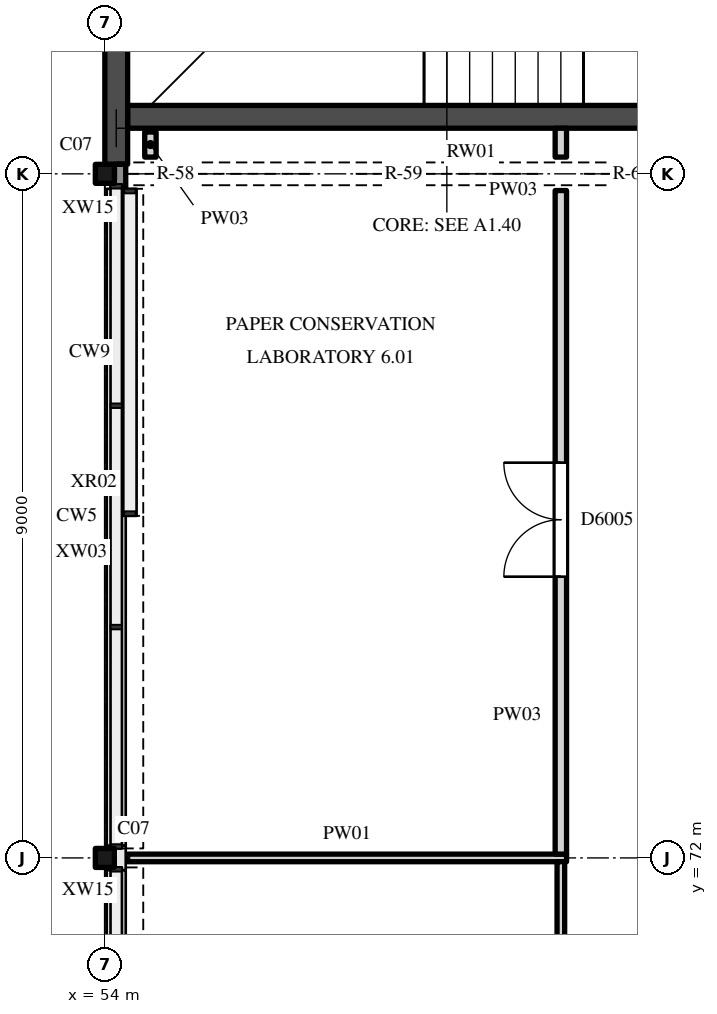
"""IFC4 building model, lengths in metres.
Left out: names, types, materials, properties, quantities, classifications, styles, units other than length and angle.
Written with IfcOpenShell. Run it as: python <this file> out.ifc"""

import sys

from ifc_helpers import new_model, si_unit, direction, frame, frame_2d, origin, origin_2d, place, context, subcontext, project, spatial, polyline, rectangle, hollow_rectangle, outline, extrude, element, fill, save


model = new_model("IFC4")
c1 = context("Model", 3, precision=1e-05, world=origin(), true_north=direction((0.0, 1.0)))
c2 = subcontext(c1, "Body", "Model", "MODEL_VIEW")
j1 = project(units=[si_unit("LENGTHUNIT", "METRE"), si_unit("PLANEANGLEUNIT", "RADIAN")], contexts=[c1])
p1 = place(None, origin())
s1 = spatial("IfcSite", under=j1, at=p1, CompositionType="ELEMENT")
p2 = place(p1, origin())
s2 = spatial("IfcBuilding", under=s1, at=p2, CompositionType="ELEMENT")
p3 = place(p2, frame((0.0, 0.0, 36.0)))
s3 = spatial("IfcBuildingStorey", under=s2, at=p3, CompositionType="ELEMENT", Elevation=36.0)
for number, where, z_axis, x_axis in (
    (1, (54.0, 72.0, 0.0), (0.0, 0.0, 1.0), (1.0, 0.0, 0.0)),
    (2, (54.0, 81.0, 0.0), (0.0, 0.0, 1.0), (1.0, 0.0, 0.0)),
):
    element("IfcColumn", number, at=place(p3, frame(where, z_axis=z_axis, x_axis=x_axis)), inside=s3, PredefinedType="COLUMN", context=c2, shape_type="SweptSolid", body=[
        extrude(hollow_rectangle(XDim=0.25, YDim=0.25, WallThickness=0.009, InnerFilletRadius=0.013, OuterFilletRadius=0.022, at=origin_2d()), origin(), (0.0, 0.0, 1.0), 8.0),
    ])
p4 = place(p3, frame((54.3, 81.75, 0.0), z_axis=(0.0, 0.0, 1.0), x_axis=(1.0, 0.0, 0.0)))
e3 = element("IfcWall", 3, at=p4, inside=s3, PredefinedType="SHEAR", context=c2, shape_type="SweptSolid", body=[
    extrude(rectangle(XDim=8.1, YDim=0.3, at=frame_2d((4.05, 0.0))), origin(), (0.0, 0.0, 1.0), 14.344),
])
p5 = place(p3, frame((54.15, 81.125, 0.0), z_axis=(0.0, 0.0, 1.0), x_axis=(0.0, 1.0, 0.0)))
e4 = element("IfcWall", 4, at=p5, inside=s3, PredefinedType="SHEAR", context=c2, shape_type="SweptSolid", body=[
    extrude(outline(polyline([(0.0, 0.0), (8.711, 0.0), (8.711, 7.875), (0.0, 14.844), (0.0, 0.0)])), frame((0.0, 0.15, 0.0), z_axis=(0.0, -1.0, 0.0), x_axis=(1.0, 0.0, 0.0)), (0.0, 0.0, 1.0), 0.3),
])
for number, where, z_axis, x_axis in (
    (5, (54.15, 63.197, 0.0), (0.0, 0.0, 1.0), (0.0, 1.0, 0.0)),
    (6, (54.15, 72.161, 0.0), (0.0, 0.0, 1.0), (0.0, 1.0, 0.0)),
):
    element("IfcWall", number, at=place(p3, frame(where, z_axis=z_axis, x_axis=x_axis)), inside=s3, PredefinedType="SOLIDWALL", context=c2, shape_type="SweptSolid", body=[
        extrude(rectangle(XDim=8.642, YDim=0.25, at=frame_2d((4.321, 0.0))), origin(), (0.0, 0.0, 1.0), 1.1),
    ])
p6 = place(p3, frame((54.2, 71.839, 0.0), z_axis=(0.0, 0.0, 1.0), x_axis=(0.0, 1.0, 0.0)))
e7 = element("IfcWall", 7, at=p6, inside=s3, PredefinedType="SOLIDWALL", context=c2, shape_type="SweptSolid", body=[
    extrude(rectangle(XDim=0.322, YDim=0.15, at=frame_2d((0.161, 0.0))), origin(), (0.0, 0.0, 1.0), 1.1),
])
p7 = place(p3, frame((54.2, 80.803, 0.0), z_axis=(0.0, 0.0, 1.0), x_axis=(0.0, 1.0, 0.0)))
e8 = element("IfcWall", 8, at=p7, inside=s3, PredefinedType="SOLIDWALL", context=c2, shape_type="SweptSolid", body=[
    extrude(rectangle(XDim=0.322, YDim=0.15, at=frame_2d((0.161, 0.0))), origin(), (0.0, 0.0, 1.0), 14.844),
])
p8 = place(p3, frame((54.15, 81.0, 15.2), z_axis=(0.0, 0.0, 1.0), x_axis=(1.0, 0.0, 0.0)))
e9 = element("IfcWall", 9, at=p8, inside=s3, PredefinedType="SOLIDWALL", context=c2, shape_type="SweptSolid", body=[
    extrude(rectangle(XDim=62.7, YDim=0.3, at=frame_2d((31.35, 0.0))), origin(), (0.0, 0.0, 1.0), 0.9),
])
p9 = place(p8, frame((0.15, 0.0, 0.15)))
e10 = element("IfcOpeningElement", 10, at=p9, cuts=e9, PredefinedType="OPENING", context=c2, shape_type="SweptSolid", body=[
    extrude(rectangle(XDim=2.4, YDim=0.6, at=frame_2d((1.2, 0.3))), frame((0.0, 0.16, 0.0), z_axis=(0.0, -1.0, 0.0), x_axis=(1.0, 0.0, 0.0)), (0.0, 0.0, 1.0), 0.32),
])
p10 = place(p8, frame((3.15, 0.0, 0.15)))
e11 = element("IfcOpeningElement", 11, at=p10, cuts=e9, PredefinedType="OPENING", context=c2, shape_type="SweptSolid", body=[
    extrude(rectangle(XDim=2.4, YDim=0.6, at=frame_2d((1.2, 0.3))), frame((0.0, 0.16, 0.0), z_axis=(0.0, -1.0, 0.0), x_axis=(1.0, 0.0, 0.0)), (0.0, 0.0, 1.0), 0.32),
])
p11 = place(p8, frame((6.15, 0.0, 0.15)))
e12 = element("IfcOpeningElement", 12, at=p11, cuts=e9, PredefinedType="OPENING", context=c2, shape_type="SweptSolid", body=[
    extrude(rectangle(XDim=2.4, YDim=0.6, at=frame_2d((1.2, 0.3))), frame((0.0, 0.16, 0.0), z_axis=(0.0, -1.0, 0.0), x_axis=(1.0, 0.0, 0.0)), (0.0, 0.0, 1.0), 0.32),
])
p12 = place(p8, frame((9.15, 0.0, 0.15)))
e13 = element("IfcOpeningElement", 13, at=p12, cuts=e9, PredefinedType="OPENING", context=c2, shape_type="SweptSolid", body=[
    extrude(rectangle(XDim=2.4, YDim=0.6, at=frame_2d((1.2, 0.3))), frame((0.0, 0.16, 0.0), z_axis=(0.0, -1.0, 0.0), x_axis=(1.0, 0.0, 0.0)), (0.0, 0.0, 1.0), 0.32),
])
p13 = place(p8, frame((12.15, 0.0, 0.15)))
e14 = element("IfcOpeningElement", 14, at=p13, cuts=e9, PredefinedType="OPENING", context=c2, shape_type="SweptSolid", body=[
    extrude(rectangle(XDim=2.4, YDim=0.6, at=frame_2d((1.2, 0.3))), frame((0.0, 0.16, 0.0), z_axis=(0.0, -1.0, 0.0), x_axis=(1.0, 0.0, 0.0)), (0.0, 0.0, 1.0), 0.32),
])
p14 = place(p8, frame((15.15, 0.0, 0.15)))
e15 = element("IfcOpeningElement", 15, at=p14, cuts=e9, PredefinedType="OPENING", context=c2, shape_type="SweptSolid", body=[
    extrude(rectangle(XDim=2.4, YDim=0.6, at=frame_2d((1.2, 0.3))), frame((0.0, 0.16, 0.0), z_axis=(0.0, -1.0, 0.0), x_axis=(1.0, 0.0, 0.0)), (0.0, 0.0, 1.0), 0.32),
])
p15 = place(p8, frame((18.15, 0.0, 0.15)))
e16 = element("IfcOpeningElement", 16, at=p15, cuts=e9, PredefinedType="OPENING", context=c2, shape_type="SweptSolid", body=[
    extrude(rectangle(XDim=2.4, YDim=0.6, at=frame_2d((1.2, 0.3))), frame((0.0, 0.16, 0.0), z_axis=(0.0, -1.0, 0.0), x_axis=(1.0, 0.0, 0.0)), (0.0, 0.0, 1.0), 0.32),
])
p16 = place(p8, frame((21.15, 0.0, 0.15)))
e17 = element("IfcOpeningElement", 17, at=p16, cuts=e9, PredefinedType="OPENING", context=c2, shape_type="SweptSolid", body=[
    extrude(rectangle(XDim=2.4, YDim=0.6, at=frame_2d((1.2, 0.3))), frame((0.0, 0.16, 0.0), z_axis=(0.0, -1.0, 0.0), x_axis=(1.0, 0.0, 0.0)), (0.0, 0.0, 1.0), 0.32),
])
p17 = place(p8, frame((24.15, 0.0, 0.15)))
e18 = element("IfcOpeningElement", 18, at=p17, cuts=e9, PredefinedType="OPENING", context=c2, shape_type="SweptSolid", body=[
    extrude(rectangle(XDim=2.4, YDim=0.6, at=frame_2d((1.2, 0.3))), frame((0.0, 0.16, 0.0), z_axis=(0.0, -1.0, 0.0), x_axis=(1.0, 0.0, 0.0)), (0.0, 0.0, 1.0), 0.32),
])
p18 = place(p8, frame((27.15, 0.0, 0.15)))
e19 = element("IfcOpeningElement", 19, at=p18, cuts=e9, PredefinedType="OPENING", context=c2, shape_type="SweptSolid", body=[
    extrude(rectangle(XDim=2.4, YDim=0.6, at=frame_2d((1.2, 0.3))), frame((0.0, 0.16, 0.0), z_axis=(0.0, -1.0, 0.0), x_axis=(1.0, 0.0, 0.0)), (0.0, 0.0, 1.0), 0.32),
])
p19 = place(p8, frame((30.15, 0.0, 0.15)))
e20 = element("IfcOpeningElement", 20, at=p19, cuts=e9, PredefinedType="OPENING", context=c2, shape_type="SweptSolid", body=[
    extrude(rectangle(XDim=2.4, YDim=0.6, at=frame_2d((1.2, 0.3))), frame((0.0, 0.16, 0.0), z_axis=(0.0, -1.0, 0.0), x_axis=(1.0, 0.0, 0.0)), (0.0, 0.0, 1.0), 0.32),
])
p20 = place(p8, frame((33.15, 0.0, 0.15)))
e21 = element("IfcOpeningElement", 21, at=p20, cuts=e9, PredefinedType="OPENING", context=c2, shape_type="SweptSolid", body=[
    extrude(rectangle(XDim=2.4, YDim=0.6, at=frame_2d((1.2, 0.3))), frame((0.0, 0.16, 0.0), z_axis=(0.0, -1.0, 0.0), x_axis=(1.0, 0.0, 0.0)), (0.0, 0.0, 1.0), 0.32),
])
p21 = place(p8, frame((36.15, 0.0, 0.15)))
e22 = element("IfcOpeningElement", 22, at=p21, cuts=e9, PredefinedType="OPENING", context=c2, shape_type="SweptSolid", body=[
    extrude(rectangle(XDim=2.4, YDim=0.6, at=frame_2d((1.2, 0.3))), frame((0.0, 0.16, 0.0), z_axis=(0.0, -1.0, 0.0), x_axis=(1.0, 0.0, 0.0)), (0.0, 0.0, 1.0), 0.32),
])
p22 = place(p8, frame((39.15, 0.0, 0.15)))
e23 = element("IfcOpeningElement", 23, at=p22, cuts=e9, PredefinedType="OPENING", context=c2, shape_type="SweptSolid", body=[
    extrude(rectangle(XDim=2.4, YDim=0.6, at=frame_2d((1.2, 0.3))), frame((0.0, 0.16, 0.0), z_axis=(0.0, -1.0, 0.0), x_axis=(1.0, 0.0, 0.0)), (0.0, 0.0, 1.0), 0.32),
])
p23 = place(p8, frame((42.15, 0.0, 0.15)))
e24 = element("IfcOpeningElement", 24, at=p23, cuts=e9, PredefinedType="OPENING", context=c2, shape_type="SweptSolid", body=[
    extrude(rectangle(XDim=2.4, YDim=0.6, at=frame_2d((1.2, 0.3))), frame((0.0, 0.16, 0.0), z_axis=(0.0, -1.0, 0.0), x_axis=(1.0, 0.0, 0.0)), (0.0, 0.0, 1.0), 0.32),
])
p24 = place(p8, frame((45.15, 0.0, 0.15)))
e25 = element("IfcOpeningElement", 25, at=p24, cuts=e9, PredefinedType="OPENING", context=c2, shape_type="SweptSolid", body=[
    extrude(rectangle(XDim=2.4, YDim=0.6, at=frame_2d((1.2, 0.3))), frame((0.0, 0.16, 0.0), z_axis=(0.0, -1.0, 0.0), x_axis=(1.0, 0.0, 0.0)), (0.0, 0.0, 1.0), 0.32),
])
p25 = place(p8, frame((48.15, 0.0, 0.15)))
e26 = element("IfcOpeningElement", 26, at=p25, cuts=e9, PredefinedType="OPENING", context=c2, shape_type="SweptSolid", body=[
    extrude(rectangle(XDim=2.4, YDim=0.6, at=frame_2d((1.2, 0.3))), frame((0.0, 0.16, 0.0), z_axis=(0.0, -1.0, 0.0), x_axis=(1.0, 0.0, 0.0)), (0.0, 0.0, 1.0), 0.32),
])
p26 = place(p8, frame((51.15, 0.0, 0.15)))
e27 = element("IfcOpeningElement", 27, at=p26, cuts=e9, PredefinedType="OPENING", context=c2, shape_type="SweptSolid", body=[
    extrude(rectangle(XDim=2.4, YDim=0.6, at=frame_2d((1.2, 0.3))), frame((0.0, 0.16, 0.0), z_axis=(0.0, -1.0, 0.0), x_axis=(1.0, 0.0, 0.0)), (0.0, 0.0, 1.0), 0.32),
])
p27 = place(p8, frame((54.15, 0.0, 0.15)))
e28 = element("IfcOpeningElement", 28, at=p27, cuts=e9, PredefinedType="OPENING", context=c2, shape_type="SweptSolid", body=[
    extrude(rectangle(XDim=2.4, YDim=0.6, at=frame_2d((1.2, 0.3))), frame((0.0, 0.16, 0.0), z_axis=(0.0, -1.0, 0.0), x_axis=(1.0, 0.0, 0.0)), (0.0, 0.0, 1.0), 0.32),
])
p28 = place(p8, frame((57.15, 0.0, 0.15)))
e29 = element("IfcOpeningElement", 29, at=p28, cuts=e9, PredefinedType="OPENING", context=c2, shape_type="SweptSolid", body=[
    extrude(rectangle(XDim=2.4, YDim=0.6, at=frame_2d((1.2, 0.3))), frame((0.0, 0.16, 0.0), z_axis=(0.0, -1.0, 0.0), x_axis=(1.0, 0.0, 0.0)), (0.0, 0.0, 1.0), 0.32),
])
p29 = place(p8, frame((60.15, 0.0, 0.15)))
e30 = element("IfcOpeningElement", 30, at=p29, cuts=e9, PredefinedType="OPENING", context=c2, shape_type="SweptSolid", body=[
    extrude(rectangle(XDim=2.4, YDim=0.6, at=frame_2d((1.2, 0.3))), frame((0.0, 0.16, 0.0), z_axis=(0.0, -1.0, 0.0), x_axis=(1.0, 0.0, 0.0)), (0.0, 0.0, 1.0), 0.32),
])
p30 = place(p3, frame((54.331, 67.5, 7.8), z_axis=(0.0, 0.0, 1.0), x_axis=(0.0, 1.0, 0.0)))
e31 = element("IfcWall", 31, at=p30, inside=s3, PredefinedType="SOLIDWALL", context=c2, shape_type="SweptSolid", body=[
    extrude(outline(polyline([(0.0, 0.0), (4.375, 0.0), (4.375, 0.044), (0.0, 3.544), (0.0, 0.0)])), frame((0.0, 0.175, 0.0), z_axis=(0.0, -1.0, 0.0), x_axis=(1.0, 0.0, 0.0)), (0.0, 0.0, 1.0), 0.35),
])
p31 = place(p3, frame((54.331, 72.125, 7.8), z_axis=(0.0, 0.0, 1.0), x_axis=(0.0, 1.0, 0.0)))
e32 = element("IfcWall", 32, at=p31, inside=s3, PredefinedType="SOLIDWALL", context=c2, shape_type="SweptSolid", body=[
    extrude(outline(polyline([(0.0, 0.0), (4.375, 0.0), (4.375, 3.544), (0.0, 0.044), (0.0, 0.0)])), frame((0.0, 0.175, 0.0), z_axis=(0.0, -1.0, 0.0), x_axis=(1.0, 0.0, 0.0)), (0.0, 0.0, 1.0), 0.35),
])
p32 = place(p3, frame((54.331, 76.5, 11.0), z_axis=(0.0, 0.0, 1.0), x_axis=(0.0, 1.0, 0.0)))
e33 = element("IfcWall", 33, at=p32, inside=s3, PredefinedType="SOLIDWALL", context=c2, shape_type="SweptSolid", body=[
    extrude(outline(polyline([(0.0, 0.0), (4.303, 0.0), (4.303, 3.786), (0.0, 0.344), (0.0, 0.0)])), frame((0.0, 0.175, 0.0), z_axis=(0.0, -1.0, 0.0), x_axis=(1.0, 0.0, 0.0)), (0.0, 0.0, 1.0), 0.35),
])
p33 = place(p3, frame((54.3, 72.0, 0.0), z_axis=(0.0, 0.0, 1.0), x_axis=(1.0, 0.0, 0.0)))
e34 = element("IfcWall", 34, at=p33, inside=s3, PredefinedType="PARTITIONING", context=c2, shape_type="SweptSolid", body=[
    extrude(rectangle(XDim=5.775, YDim=0.1, at=frame_2d((2.887, 0.0))), origin(), (0.0, 0.0, 1.0), 7.366),
])
p34 = place(p3, frame((54.6, 81.22, 0.0), z_axis=(0.0, 0.0, 1.0), x_axis=(0.0, 1.0, 0.0)))
e35 = element("IfcWall", 35, at=p34, inside=s3, PredefinedType="PARTITIONING", context=c2, shape_type="SweptSolid", body=[
    extrude(rectangle(XDim=0.33, YDim=0.15, at=frame_2d((0.165, 0.0))), origin(), (0.0, 0.0, 1.0), 7.744),
])
p35 = place(p3, frame((60.0, 63.22, 0.0), z_axis=(0.0, 0.0, 1.0), x_axis=(0.0, 1.0, 0.0)))
e36 = element("IfcWall", 36, at=p35, inside=s3, PredefinedType="PARTITIONING", context=c2, shape_type="SweptSolid", body=[
    extrude(rectangle(XDim=8.73, YDim=0.1, at=frame_2d((4.365, 0.0))), origin(), (0.0, 0.0, 1.0), 7.744),
])
p36 = place(p35, frame((3.75, 0.0, 0.0)))
e37 = element("IfcOpeningElement", 37, at=p36, cuts=e36, PredefinedType="OPENING", context=c2, shape_type="SweptSolid", body=[
    extrude(rectangle(XDim=1.2, YDim=2.4, at=frame_2d((0.6, 1.2))), frame((0.0, 0.06, 0.0), z_axis=(0.0, -1.0, 0.0), x_axis=(1.0, 0.0, 0.0)), (0.0, 0.0, 1.0), 0.12),
])
p37 = place(p3, frame((60.0, 72.05, 0.0), z_axis=(0.0, 0.0, 1.0), x_axis=(0.0, 1.0, 0.0)))
e38 = element("IfcWall", 38, at=p37, inside=s3, PredefinedType="PARTITIONING", context=c2, shape_type="SweptSolid", body=[
    extrude(rectangle(XDim=8.73, YDim=0.15, at=frame_2d((4.365, 0.0))), origin(), (0.0, 0.0, 1.0), 7.744),
])
p38 = place(p37, frame((3.65, 0.0, 0.0)))
e39 = element("IfcOpeningElement", 39, at=p38, cuts=e38, PredefinedType="OPENING", context=c2, shape_type="SweptSolid", body=[
    extrude(rectangle(XDim=1.5, YDim=2.1, at=frame_2d((0.75, 1.05))), frame((0.0, 0.085, 0.0), z_axis=(0.0, -1.0, 0.0), x_axis=(1.0, 0.0, 0.0)), (0.0, 0.0, 1.0), 0.17),
])
p39 = place(p3, frame((60.0, 81.22, 0.0), z_axis=(0.0, 0.0, 1.0), x_axis=(0.0, 1.0, 0.0)))
e40 = element("IfcWall", 40, at=p39, inside=s3, PredefinedType="PARTITIONING", context=c2, shape_type="SweptSolid", body=[
    extrude(rectangle(XDim=0.38, YDim=0.15, at=frame_2d((0.19, 0.0))), origin(), (0.0, 0.0, 1.0), 7.744),
])
p40 = place(p9, origin())
e41 = element("IfcWindow", 41, at=p40, inside=s3, PartitioningType="SINGLE_PANEL", PredefinedType="SKYLIGHT", context=c2, shape_type="SweptSolid", body=[
    extrude(rectangle(XDim=2.4, YDim=0.6, at=frame_2d((1.2, 0.3))), frame((0.0, 0.03, 0.0), z_axis=(0.0, -1.0, 0.0), x_axis=(1.0, 0.0, 0.0)), (0.0, 0.0, 1.0), 0.06),
])
fill(e10, e41)
p41 = place(p10, origin())
e42 = element("IfcWindow", 42, at=p41, inside=s3, PartitioningType="SINGLE_PANEL", PredefinedType="SKYLIGHT", context=c2, shape_type="SweptSolid", body=[
    extrude(rectangle(XDim=2.4, YDim=0.6, at=frame_2d((1.2, 0.3))), frame((0.0, 0.03, 0.0), z_axis=(0.0, -1.0, 0.0), x_axis=(1.0, 0.0, 0.0)), (0.0, 0.0, 1.0), 0.06),
])
fill(e11, e42)
p42 = place(p11, origin())
e43 = element("IfcWindow", 43, at=p42, inside=s3, PartitioningType="SINGLE_PANEL", PredefinedType="SKYLIGHT", context=c2, shape_type="SweptSolid", body=[
    extrude(rectangle(XDim=2.4, YDim=0.6, at=frame_2d((1.2, 0.3))), frame((0.0, 0.03, 0.0), z_axis=(0.0, -1.0, 0.0), x_axis=(1.0, 0.0, 0.0)), (0.0, 0.0, 1.0), 0.06),
])
fill(e12, e43)
p43 = place(p38, origin())
e44 = element("IfcDoor", 44, at=p43, inside=s3, OperationType="DOUBLE_DOOR_SINGLE_SWING", PredefinedType="DOOR", context=c2, shape_type="SweptSolid", body=[
    extrude(rectangle(XDim=1.5, YDim=2.1, at=frame_2d((0.75, 1.05))), frame((0.0, 0.025, 0.0), z_axis=(0.0, -1.0, 0.0), x_axis=(1.0, 0.0, 0.0)), (0.0, 0.0, 1.0), 0.05),
])
fill(e39, e44)
save(model, sys.argv[1])
